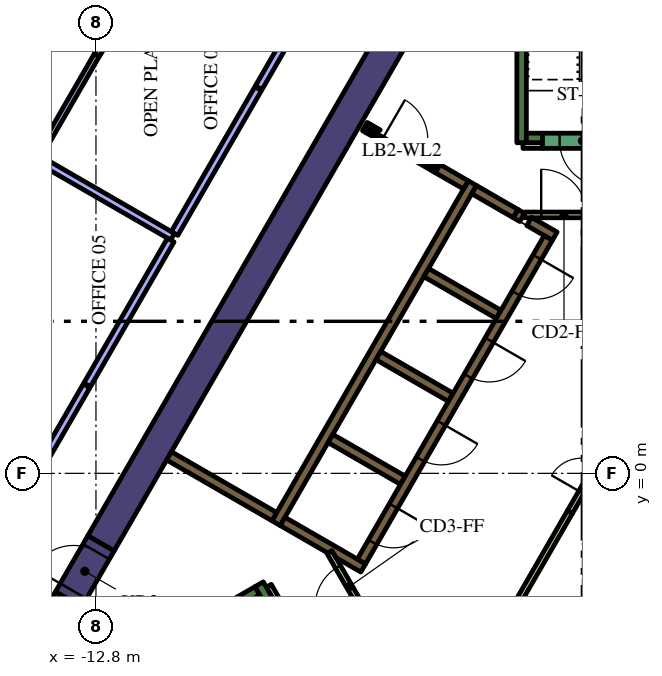
"""IFC4 building model, lengths in metres.
Left out: names, types, materials, properties, quantities, classifications, styles, units other than length and angle.
Written with IfcOpenShell. Run it as: python <this file> out.ifc"""

import sys

from ifc_helpers import new_model, si_unit, direction, frame, frame_2d, origin, place, context, subcontext, project, spatial, polyline, rectangle, outline, extrude, element, fill, save


model = new_model("IFC4")
c1 = context("Model", 3, precision=1e-05, world=origin(), true_north=direction((0.0, 1.0)))
c2 = subcontext(c1, "Body", "Model", "MODEL_VIEW")
j1 = project(units=[si_unit("LENGTHUNIT", "METRE"), si_unit("PLANEANGLEUNIT", "RADIAN")], contexts=[c1])
p1 = place(None, origin())
s1 = spatial("IfcSite", under=j1, at=p1, CompositionType="ELEMENT")
p2 = place(p1, origin())
s2 = spatial("IfcBuilding", under=s1, at=p2, CompositionType="ELEMENT")
p3 = place(p2, frame((0.0, 0.0, 158.4)))
s3 = spatial("IfcBuildingStorey", under=s2, at=p3, CompositionType="ELEMENT", Elevation=158.4)
p4 = place(p3, frame((-13.518, -3.314, 0.0), z_axis=(0.0, 0.0, 1.0), x_axis=(-0.499969377405, -0.866043083026, 0.0)))
e1 = element("IfcWall", 1, at=p4, inside=s3, PredefinedType="SOLIDWALL", context=c2, shape_type="SweptSolid", body=[
    extrude(rectangle(XDim=2.824, YDim=0.8, at=frame_2d((1.412, 0.0))), origin(), (0.0, 0.0, 1.0), 4.2),
])
p5 = place(p3, frame((-12.668, -1.842, 0.0), z_axis=(0.0, 0.0, 1.0), x_axis=(0.500003640647, 0.866023301845, 0.0)))
e2 = element("IfcWall", 2, at=p5, inside=s3, PredefinedType="SOLIDWALL", context=c2, shape_type="SweptSolid", body=[
    extrude(rectangle(XDim=15.858, YDim=0.8, at=frame_2d((7.929, 0.0))), origin(), (0.0, 0.0, 1.0), 4.2),
])
p6 = place(p3, frame((-1.6, 8.7, 0.0), z_axis=(0.0, 0.0, 1.0), x_axis=(0.0, 1.0, 0.0)))
e3 = element("IfcWall", 3, at=p6, inside=s3, PredefinedType="SOLIDWALL", context=c2, shape_type="SweptSolid", body=[
    extrude(rectangle(XDim=7.05, YDim=0.25, at=frame_2d((3.525, 0.0))), origin(), (0.0, 0.0, 1.0), 4.2),
])
p7 = place(p3, frame((-1.475, 8.825, 0.0), z_axis=(0.0, 0.0, 1.0), x_axis=(1.0, 0.0, 0.0)))
e4 = element("IfcWall", 4, at=p7, inside=s3, PredefinedType="SOLIDWALL", context=c2, shape_type="SweptSolid", body=[
    extrude(rectangle(XDim=0.425, YDim=0.25, at=frame_2d((0.212, 0.0))), origin(), (0.0, 0.0, 1.0), 4.2),
])
p8 = place(p3, frame((-14.44, -6.49, 0.0), z_axis=(0.0, 0.0, 1.0), x_axis=(0.866022966069, 0.500004222222, 0.0)))
e5 = element("IfcWall", 5, at=p8, inside=s3, PredefinedType="SOLIDWALL", context=c2, shape_type="SweptSolid", body=[
    extrude(rectangle(XDim=6.8, YDim=0.25, at=frame_2d((3.4, 0.0))), origin(), (0.0, 0.0, 1.0), 4.2),
])
p9 = place(p3, frame((-8.168, -3.503, 0.0), z_axis=(0.0, 0.0, 1.0), x_axis=(-0.499952099219, 0.866053057547, 0.0)))
e6 = element("IfcWall", 6, at=p9, inside=s3, PredefinedType="SOLIDWALL", context=c2, shape_type="SweptSolid", body=[
    extrude(rectangle(XDim=0.675, YDim=0.25, at=frame_2d((0.337, 0.0))), origin(), (0.0, 0.0, 1.0), 4.2),
])
p10 = place(p3, frame((-8.06, -1.311, 0.0), z_axis=(0.0, 0.0, 1.0), x_axis=(0.50000273126, 0.866023826885, 0.0)))
e7 = element("IfcWall", 7, at=p10, inside=s3, PredefinedType="SOLIDWALL", context=c2, shape_type="SweptSolid", body=[
    extrude(rectangle(XDim=10.33, YDim=0.25, at=frame_2d((5.165, 0.0))), origin(), (0.0, 0.0, 1.0), 4.2),
])
p11 = place(p3, frame((-1.758, 6.835, 0.0), z_axis=(0.0, 0.0, 1.0), x_axis=(0.865982457891, -0.500074377092, 0.0)))
e8 = element("IfcWall", 8, at=p11, inside=s3, PredefinedType="SOLIDWALL", context=c2, shape_type="SweptSolid", body=[
    extrude(rectangle(XDim=0.2, YDim=0.25, at=frame_2d((0.1, 0.0))), origin(), (0.0, 0.0, 1.0), 4.2),
])
p12 = place(p3, frame((-1.76, 6.836, 0.0), z_axis=(0.0, 0.0, 1.0), x_axis=(-0.865952863304, 0.500125622755, 0.0)))
e9 = element("IfcWall", 9, at=p12, inside=s3, PredefinedType="SOLIDWALL", context=c2, shape_type="SweptSolid", body=[
    extrude(rectangle(XDim=1.258, YDim=0.25, at=frame_2d((0.629, 0.0))), origin(), (0.0, 0.0, 1.0), 4.2),
])
p13 = place(p3, frame((-0.728, 6.24, 0.0), z_axis=(0.0, 0.0, 1.0), x_axis=(-0.865955664968, 0.500120771724, 0.0)))
e10 = element("IfcWall", 10, at=p13, inside=s3, PredefinedType="SOLIDWALL", context=c2, shape_type="SweptSolid", body=[
    extrude(rectangle(XDim=0.778, YDim=0.25, at=frame_2d((0.389, 0.0))), origin(), (0.0, 0.0, 1.0), 4.2),
])
for number, where, z_axis, x_axis in (
    (11, (-2.204, 4.182, 0.0), (0.0, 0.0, 1.0), (-0.866, 0.5, 0.0)),
    (12, (-5.369, 3.1, 0.0), (0.0, 0.0, 1.0), (0.866, -0.5, 0.0)),
    (13, (-4.724, -0.182, 0.0), (0.0, 0.0, 1.0), (-0.866, 0.5, 0.0)),
):
    element("IfcWall", number, at=place(p3, frame(where, z_axis=z_axis, x_axis=x_axis)), inside=s3, PredefinedType="SOLIDWALL", context=c2, shape_type="SweptSolid", body=[
        extrude(rectangle(XDim=2.2, YDim=0.25, at=frame_2d((1.1, 0.0))), origin(), (0.0, 0.0, 1.0), 4.2),
    ])
p14 = place(p3, origin())
e14 = element("IfcWall", 14, at=p14, inside=s3, PredefinedType="SOLIDWALL", context=c2, shape_type="SweptSolid", body=[
    extrude(outline(polyline([(-5.922, -2.257), (-5.922, -2.257), (-5.705, -2.382), (-5.83, -2.598), (-6.483, -2.221), (-6.591, -2.033), (-6.591, -2.033), (-6.7, -2.096), (-7.952, -1.373), (-7.827, -1.156), (-5.922, -2.257)])), origin(), (0.0, 0.0, 1.0), 4.2),
])
p15 = place(p3, frame((-8.106, -1.14, 0.0), z_axis=(0.0, 0.0, 1.0), x_axis=(-0.866008981251, 0.500028443584, 0.0)))
e15 = element("IfcWall", 15, at=p15, inside=s3, PredefinedType="SOLIDWALL", context=c2, shape_type="SweptSolid", body=[
    extrude(rectangle(XDim=3.2, YDim=0.25, at=frame_2d((1.6, 0.0))), origin(), (0.0, 0.0, 1.0), 4.2),
])
p16 = place(p3, frame((-5.725, 9.125, 0.0), z_axis=(0.0, 0.0, 1.0), x_axis=(0.866185586049, -0.49972245349, 0.0)))
e16 = element("IfcWall", 16, at=p16, inside=s3, PredefinedType="SOLIDWALL", context=c2, shape_type="SweptSolid", body=[
    extrude(rectangle(XDim=0.11, YDim=0.25, at=frame_2d((0.055, 0.0))), origin(), (0.0, 0.0, 1.0), 4.2),
])
p17 = place(p3, frame((-3.066, 7.59, 0.0), z_axis=(0.0, 0.0, 1.0), x_axis=(-0.866081358704, 0.49990307071, 0.0)))
e17 = element("IfcWall", 17, at=p17, inside=s3, PredefinedType="SOLIDWALL", context=c2, shape_type="SweptSolid", body=[
    extrude(rectangle(XDim=0.858, YDim=0.25, at=frame_2d((0.429, 0.0))), origin(), (0.0, 0.0, 1.0), 4.2),
])
e18 = element("IfcWall", 18, at=p14, inside=s3, PredefinedType="SOLIDWALL", context=c2, shape_type="SweptSolid", body=[
    extrude(outline(polyline([(-3.748, 8.128), (-3.813, 8.015), (-4.027, 8.139), (-4.017, 8.156), (-4.008, 8.173), (-4.0, 8.192), (-3.995, 8.21), (-3.991, 8.23), (-3.99, 8.25), (-3.99, 8.268), (-3.748, 8.128)])), origin(), (0.0, 0.0, 1.0), 4.2),
])
e19 = element("IfcWall", 19, at=p14, inside=s3, PredefinedType="SOLIDWALL", context=c2, shape_type="SweptSolid", body=[
    extrude(outline(polyline([(-5.689, 8.96), (-5.69, 8.961), (-5.565, 9.177), (-5.319, 9.035), (-5.335, 9.026), (-5.351, 9.015), (-5.366, 9.002), (-5.379, 8.988), (-5.392, 8.972), (-5.402, 8.956), (-5.412, 8.939), (-5.629, 9.064), (-5.629, 9.064), (-5.689, 8.96)])), origin(), (0.0, 0.0, 1.0), 4.2),
])
for number, where, z_axis, x_axis in (
    (20, (-8.252, -2.958, 0.0), (0.0, 0.0, 1.0), (0.5, -0.866, 0.0)),
    (21, (-1.564, 8.625, 0.0), (0.0, 0.0, 1.0), (1.0, 0.0, 0.0)),
):
    element("IfcWall", number, at=place(p3, frame(where, z_axis=z_axis, x_axis=x_axis)), inside=s3, PredefinedType="PARTITIONING", context=c2, shape_type="SweptSolid", body=[
        extrude(rectangle(XDim=0.514, YDim=0.15, at=frame_2d((0.257, 0.0))), origin(), (0.0, 0.0, 1.0), 3.15),
    ])
p18 = place(p3, frame((-1.887, -3.718, 0.0), z_axis=(0.0, 0.0, 1.0), x_axis=(0.500043732237, 0.866000153493, 0.0)))
e22 = element("IfcWall", 22, at=p18, inside=s3, PredefinedType="PARTITIONING", context=c2, shape_type="SweptSolid", body=[
    extrude(rectangle(XDim=3.114, YDim=0.15, at=frame_2d((1.557, 0.0))), origin(), (0.0, 0.0, 1.0), 3.15),
])
p19 = place(p3, frame((-0.898, 6.194, 0.0), z_axis=(0.0, 0.0, 1.0), x_axis=(-0.499996202215, -0.866027596426, 0.0)))
e23 = element("IfcWall", 23, at=p19, inside=s3, PredefinedType="SOLIDWALL", context=c2, shape_type="SweptSolid", body=[
    extrude(rectangle(XDim=9.83, YDim=0.25, at=frame_2d((4.915, 0.0))), origin(), (0.0, 0.0, 1.0), 4.2),
])
p20 = place(p19, frame((0.585, 0.0, 0.0)))
e24 = element("IfcOpeningElement", 24, at=p20, cuts=e23, PredefinedType="OPENING", context=c2, shape_type="SweptSolid", body=[
    extrude(rectangle(XDim=1.1, YDim=2.1, at=frame_2d((0.55, 1.05))), frame((0.0, 0.135, 0.0), z_axis=(0.0, -1.0, 0.0), x_axis=(1.0, 0.0, 0.0)), (0.0, 0.0, 1.0), 0.27),
])
p21 = place(p19, frame((3.105, 0.0, 0.0)))
e25 = element("IfcOpeningElement", 25, at=p21, cuts=e23, PredefinedType="OPENING", context=c2, shape_type="SweptSolid", body=[
    extrude(rectangle(XDim=1.1, YDim=2.1, at=frame_2d((0.55, 1.05))), frame((0.0, 0.135, 0.0), z_axis=(0.0, -1.0, 0.0), x_axis=(1.0, 0.0, 0.0)), (0.0, 0.0, 1.0), 0.27),
])
p22 = place(p19, frame((5.625, 0.0, 0.0)))
e26 = element("IfcOpeningElement", 26, at=p22, cuts=e23, PredefinedType="OPENING", context=c2, shape_type="SweptSolid", body=[
    extrude(rectangle(XDim=1.1, YDim=2.1, at=frame_2d((0.55, 1.05))), frame((0.0, 0.135, 0.0), z_axis=(0.0, -1.0, 0.0), x_axis=(1.0, 0.0, 0.0)), (0.0, 0.0, 1.0), 0.27),
])
p23 = place(p19, frame((8.145, 0.0, 0.0)))
e27 = element("IfcOpeningElement", 27, at=p23, cuts=e23, PredefinedType="OPENING", context=c2, shape_type="SweptSolid", body=[
    extrude(rectangle(XDim=1.1, YDim=2.1, at=frame_2d((0.55, 1.05))), frame((0.0, 0.135, 0.0), z_axis=(0.0, -1.0, 0.0), x_axis=(1.0, 0.0, 0.0)), (0.0, 0.0, 1.0), 0.27),
])
p24 = place(p3, frame((1.05, 8.75, 0.0), z_axis=(0.0, 0.0, 1.0), x_axis=(-1.0, 0.0, 0.0)))
e28 = element("IfcWall", 28, at=p24, inside=s3, PredefinedType="SOLIDWALL", context=c2, shape_type="SweptSolid", body=[
    extrude(rectangle(XDim=2.1, YDim=0.4, at=frame_2d((1.05, 0.0))), origin(), (0.0, 0.0, 1.0), 4.2),
])
p25 = place(p24, frame((0.45, 0.0, 0.0)))
e29 = element("IfcOpeningElement", 29, at=p25, cuts=e28, PredefinedType="OPENING", context=c2, shape_type="SweptSolid", body=[
    extrude(rectangle(XDim=1.2, YDim=2.1, at=frame_2d((0.6, 1.05))), frame((0.0, 0.21, 0.0), z_axis=(0.0, -1.0, 0.0), x_axis=(1.0, 0.0, 0.0)), (0.0, 0.0, 1.0), 0.42),
])
p26 = place(p3, frame((-0.33, -1.022, 0.0), z_axis=(0.0, 0.0, 1.0), x_axis=(0.500027713859, 0.866009402589, 0.0)))
e30 = element("IfcWall", 30, at=p26, inside=s3, PredefinedType="PARTITIONING", context=c2, shape_type="SweptSolid", body=[
    extrude(rectangle(XDim=2.1, YDim=0.15, at=frame_2d((1.05, 0.0))), origin(), (0.0, 0.0, 1.0), 3.15),
])
p27 = place(p26, frame((0.6, 0.0, 0.0)))
e31 = element("IfcOpeningElement", 31, at=p27, cuts=e30, PredefinedType="OPENING", context=c2, shape_type="SweptSolid", body=[
    extrude(rectangle(XDim=0.9, YDim=2.1, at=frame_2d((0.45, 1.05))), frame((0.0, 0.085, 0.0), z_axis=(0.0, -1.0, 0.0), x_axis=(1.0, 0.0, 0.0)), (0.0, 0.0, 1.0), 0.17),
])
p28 = place(p3, frame((-1.534, 6.8, 0.0), z_axis=(0.0, 0.0, 1.0), x_axis=(1.0, 0.0, 0.0)))
e32 = element("IfcWall", 32, at=p28, inside=s3, PredefinedType="PARTITIONING", context=c2, shape_type="SweptSolid", body=[
    extrude(rectangle(XDim=2.1, YDim=0.15, at=frame_2d((1.05, 0.0))), origin(), (0.0, 0.0, 1.0), 3.15),
])
p29 = place(p28, frame((0.45, 0.0, 0.0)))
e33 = element("IfcOpeningElement", 33, at=p29, cuts=e32, PredefinedType="OPENING", context=c2, shape_type="SweptSolid", body=[
    extrude(rectangle(XDim=1.2, YDim=2.1, at=frame_2d((0.6, 1.05))), frame((0.0, 0.085, 0.0), z_axis=(0.0, -1.0, 0.0), x_axis=(1.0, 0.0, 0.0)), (0.0, 0.0, 1.0), 0.17),
])
p30 = place(p3, frame((-5.606, -3.89, 0.0), z_axis=(0.0, 0.0, 1.0), x_axis=(-0.500027713859, 0.866009402589, 0.0)))
e34 = element("IfcWall", 34, at=p30, inside=s3, PredefinedType="PARTITIONING", context=c2, shape_type="SweptSolid", body=[
    extrude(rectangle(XDim=2.1, YDim=0.15, at=frame_2d((1.05, 0.0))), origin(), (0.0, 0.0, 1.0), 3.15),
])
p31 = place(p30, frame((0.45, 0.0, 0.0)))
e35 = element("IfcOpeningElement", 35, at=p31, cuts=e34, PredefinedType="OPENING", context=c2, shape_type="SweptSolid", body=[
    extrude(rectangle(XDim=1.2, YDim=2.1, at=frame_2d((0.6, 1.05))), frame((0.0, 0.085, 0.0), z_axis=(0.0, -1.0, 0.0), x_axis=(1.0, 0.0, 0.0)), (0.0, 0.0, 1.0), 0.17),
])
p32 = place(p3, frame((-5.659, 9.012, 0.0), z_axis=(0.0, 0.0, 1.0), x_axis=(0.866009402589, -0.500027713859, 0.0)))
e36 = element("IfcWall", 36, at=p32, inside=s3, PredefinedType="PARTITIONING", context=c2, shape_type="SweptSolid", body=[
    extrude(rectangle(XDim=2.1, YDim=0.12, at=frame_2d((1.05, 0.0))), origin(), (0.0, 0.0, 1.0), 3.15),
])
p33 = place(p32, frame((0.45, 0.0, 0.0)))
e37 = element("IfcOpeningElement", 37, at=p33, cuts=e36, PredefinedType="OPENING", context=c2, shape_type="SweptSolid", body=[
    extrude(rectangle(XDim=1.2, YDim=2.1, at=frame_2d((0.6, 1.05))), frame((0.0, 0.07, 0.0), z_axis=(0.0, -1.0, 0.0), x_axis=(1.0, 0.0, 0.0)), (0.0, 0.0, 1.0), 0.14),
])
p34 = place(p3, frame((-13.518, -3.314, 0.0), z_axis=(0.0, 0.0, 1.0), x_axis=(0.500062241894, 0.865989465428, 0.0)))
e38 = element("IfcWall", 38, at=p34, inside=s3, PredefinedType="SOLIDWALL", context=c2, shape_type="SweptSolid", body=[
    extrude(rectangle(XDim=1.7, YDim=0.8, at=frame_2d((0.85, 0.0))), origin(), (0.0, 0.0, 1.0), 4.2),
])
p35 = place(p34, frame((0.25, 0.0, 0.0)))
e39 = element("IfcOpeningElement", 39, at=p35, cuts=e38, PredefinedType="OPENING", context=c2, shape_type="SweptSolid", body=[
    extrude(rectangle(XDim=1.2, YDim=2.1, at=frame_2d((0.6, 1.05))), frame((0.0, 0.41, 0.0), z_axis=(0.0, -1.0, 0.0), x_axis=(1.0, 0.0, 0.0)), (0.0, 0.0, 1.0), 0.82),
])
p36 = place(p3, frame((-12.779, 11.002, 0.0), z_axis=(0.0, 0.0, 1.0), x_axis=(0.527026092571, 0.849849102929, 0.0)))
e40 = element("IfcWall", 40, at=p36, inside=s3, PredefinedType="PARTITIONING", context=c2, shape_type="SweptSolid", body=[
    extrude(rectangle(XDim=6.407, YDim=0.15, at=frame_2d((3.204, 0.0))), origin(), (0.0, 0.0, 1.0), 3.15),
])
p37 = place(p36, frame((2.707, 0.0, 0.0)))
e41 = element("IfcOpeningElement", 41, at=p37, cuts=e40, PredefinedType="OPENING", context=c2, shape_type="SweptSolid", body=[
    extrude(rectangle(XDim=0.9, YDim=2.1, at=frame_2d((0.45, 1.05))), frame((0.0, 0.085, 0.0), z_axis=(0.0, -1.0, 0.0), x_axis=(1.0, 0.0, 0.0)), (0.0, 0.0, 1.0), 0.17),
])
p38 = place(p3, frame((-12.779, 11.002, 0.0), z_axis=(0.0, 0.0, 1.0), x_axis=(-0.499996312652, -0.866027532665, 0.0)))
e42 = element("IfcWall", 42, at=p38, inside=s3, PredefinedType="PARTITIONING", context=c2, shape_type="SweptSolid", body=[
    extrude(rectangle(XDim=3.138, YDim=0.15, at=frame_2d((1.569, 0.0))), origin(), (0.0, 0.0, 1.0), 3.15),
])
p39 = place(p3, frame((-10.782, 6.225, 0.0), z_axis=(0.0, 0.0, 1.0), x_axis=(-0.866034752867, 0.499983806564, 0.0)))
e43 = element("IfcWall", 43, at=p39, inside=s3, PredefinedType="PARTITIONING", context=c2, shape_type="SweptSolid", body=[
    extrude(rectangle(XDim=4.043, YDim=0.2, at=frame_2d((2.021, 0.0))), origin(), (0.0, 0.0, 1.0), 3.15),
])
p40 = place(p3, frame((-8.532, 10.122, 0.0), z_axis=(0.0, 0.0, 1.0), x_axis=(-0.499988222896, -0.866032203192, 0.0)))
e44 = element("IfcWall", 44, at=p40, inside=s3, PredefinedType="PARTITIONING", context=c2, shape_type="SweptSolid", body=[
    extrude(rectangle(XDim=4.4, YDim=0.2, at=frame_2d((2.2, 0.0))), origin(), (0.0, 0.0, 1.0), 3.15),
])
p41 = place(p3, frame((-3.522, 18.8, 0.0), z_axis=(0.0, 0.0, 1.0), x_axis=(-0.500015783377, -0.866016291056, 0.0)))
e45 = element("IfcWall", 45, at=p41, inside=s3, PredefinedType="PARTITIONING", context=c2, shape_type="SweptSolid", body=[
    extrude(rectangle(XDim=9.99, YDim=0.2, at=frame_2d((4.995, 0.0))), origin(), (0.0, 0.0, 1.0), 3.15),
])
p42 = place(p41, frame((4.5, 0.0, 0.0)))
e46 = element("IfcOpeningElement", 46, at=p42, cuts=e45, PredefinedType="OPENING", context=c2, shape_type="SweptSolid", body=[
    extrude(rectangle(XDim=1.0, YDim=2.1, at=frame_2d((0.5, 1.05))), frame((0.0, 0.11, 0.0), z_axis=(0.0, -1.0, 0.0), x_axis=(1.0, 0.0, 0.0)), (0.0, 0.0, 1.0), 0.22),
])
p43 = place(p3, frame((-10.832, 6.138, 0.0), z_axis=(0.0, 0.0, 1.0), x_axis=(-0.499988222896, -0.866032203192, 0.0)))
e47 = element("IfcWall", 47, at=p43, inside=s3, PredefinedType="PARTITIONING", context=c2, shape_type="SweptSolid", body=[
    extrude(rectangle(XDim=4.4, YDim=0.2, at=frame_2d((2.2, 0.0))), origin(), (0.0, 0.0, 1.0), 3.15),
])
p44 = place(p3, frame((-13.047, 2.302, 0.0), z_axis=(0.0, 0.0, 1.0), x_axis=(-0.499986873641, -0.866032982159, 0.0)))
e48 = element("IfcWall", 48, at=p44, inside=s3, PredefinedType="PARTITIONING", context=c2, shape_type="SweptSolid", body=[
    extrude(rectangle(XDim=9.99, YDim=0.2, at=frame_2d((4.995, 0.0))), origin(), (0.0, 0.0, 1.0), 3.15),
])
p45 = place(p44, frame((4.5, 0.0, 0.0)))
e49 = element("IfcOpeningElement", 49, at=p45, cuts=e48, PredefinedType="OPENING", context=c2, shape_type="SweptSolid", body=[
    extrude(rectangle(XDim=1.0, YDim=2.1, at=frame_2d((0.5, 1.05))), frame((0.0, 0.11, 0.0), z_axis=(0.0, -1.0, 0.0), x_axis=(1.0, 0.0, 0.0)), (0.0, 0.0, 1.0), 0.22),
])
p46 = place(p20, origin())
e50 = element("IfcDoor", 50, at=p46, inside=s3, OperationType="DOUBLE_DOOR_SLIDING", PredefinedType="DOOR", context=c2, shape_type="SweptSolid", body=[
    extrude(rectangle(XDim=1.1, YDim=2.1, at=frame_2d((0.55, 1.05))), frame((0.0, 0.025, 0.0), z_axis=(0.0, -1.0, 0.0), x_axis=(1.0, 0.0, 0.0)), (0.0, 0.0, 1.0), 0.05),
])
fill(e24, e50)
p47 = place(p21, origin())
e51 = element("IfcDoor", 51, at=p47, inside=s3, OperationType="DOUBLE_DOOR_SLIDING", PredefinedType="DOOR", context=c2, shape_type="SweptSolid", body=[
    extrude(rectangle(XDim=1.1, YDim=2.1, at=frame_2d((0.55, 1.05))), frame((0.0, 0.025, 0.0), z_axis=(0.0, -1.0, 0.0), x_axis=(1.0, 0.0, 0.0)), (0.0, 0.0, 1.0), 0.05),
])
fill(e25, e51)
p48 = place(p22, origin())
e52 = element("IfcDoor", 52, at=p48, inside=s3, OperationType="DOUBLE_DOOR_SLIDING", PredefinedType="DOOR", context=c2, shape_type="SweptSolid", body=[
    extrude(rectangle(XDim=1.1, YDim=2.1, at=frame_2d((0.55, 1.05))), frame((0.0, 0.025, 0.0), z_axis=(0.0, -1.0, 0.0), x_axis=(1.0, 0.0, 0.0)), (0.0, 0.0, 1.0), 0.05),
])
fill(e26, e52)
p49 = place(p23, origin())
e53 = element("IfcDoor", 53, at=p49, inside=s3, OperationType="DOUBLE_DOOR_SLIDING", PredefinedType="DOOR", context=c2, shape_type="SweptSolid", body=[
    extrude(rectangle(XDim=1.1, YDim=2.1, at=frame_2d((0.55, 1.05))), frame((0.0, 0.025, 0.0), z_axis=(0.0, -1.0, 0.0), x_axis=(1.0, 0.0, 0.0)), (0.0, 0.0, 1.0), 0.05),
])
fill(e27, e53)
p50 = place(p25, origin())
e54 = element("IfcDoor", 54, at=p50, inside=s3, OperationType="SINGLE_SWING_LEFT", PredefinedType="DOOR", context=c2, shape_type="SweptSolid", body=[
    extrude(rectangle(XDim=1.2, YDim=2.1, at=frame_2d((0.6, 1.05))), frame((0.0, 0.025, 0.0), z_axis=(0.0, -1.0, 0.0), x_axis=(1.0, 0.0, 0.0)), (0.0, 0.0, 1.0), 0.05),
])
fill(e29, e54)
p51 = place(p27, origin())
e55 = element("IfcDoor", 55, at=p51, inside=s3, OperationType="SINGLE_SWING_LEFT", PredefinedType="DOOR", context=c2, shape_type="SweptSolid", body=[
    extrude(rectangle(XDim=0.9, YDim=2.1, at=frame_2d((0.45, 1.05))), frame((0.0, 0.025, 0.0), z_axis=(0.0, -1.0, 0.0), x_axis=(1.0, 0.0, 0.0)), (0.0, 0.0, 1.0), 0.05),
])
fill(e31, e55)
p52 = place(p29, origin())
e56 = element("IfcDoor", 56, at=p52, inside=s3, OperationType="SINGLE_SWING_LEFT", PredefinedType="DOOR", context=c2, shape_type="SweptSolid", body=[
    extrude(rectangle(XDim=1.2, YDim=2.1, at=frame_2d((0.6, 1.05))), frame((0.0, 0.025, 0.0), z_axis=(0.0, -1.0, 0.0), x_axis=(1.0, 0.0, 0.0)), (0.0, 0.0, 1.0), 0.05),
])
fill(e33, e56)
p53 = place(p31, origin())
e57 = element("IfcDoor", 57, at=p53, inside=s3, OperationType="SINGLE_SWING_LEFT", PredefinedType="DOOR", context=c2, shape_type="SweptSolid", body=[
    extrude(rectangle(XDim=1.2, YDim=2.1, at=frame_2d((0.6, 1.05))), frame((0.0, 0.025, 0.0), z_axis=(0.0, -1.0, 0.0), x_axis=(1.0, 0.0, 0.0)), (0.0, 0.0, 1.0), 0.05),
])
fill(e35, e57)
p54 = place(p33, origin())
e58 = element("IfcDoor", 58, at=p54, inside=s3, OperationType="SINGLE_SWING_LEFT", PredefinedType="DOOR", context=c2, shape_type="SweptSolid", body=[
    extrude(rectangle(XDim=1.2, YDim=2.1, at=frame_2d((0.6, 1.05))), frame((0.0, 0.025, 0.0), z_axis=(0.0, -1.0, 0.0), x_axis=(1.0, 0.0, 0.0)), (0.0, 0.0, 1.0), 0.05),
])
fill(e37, e58)
p55 = place(p35, origin())
e59 = element("IfcDoor", 59, at=p55, inside=s3, OperationType="SINGLE_SWING_LEFT", PredefinedType="DOOR", context=c2, shape_type="SweptSolid", body=[
    extrude(rectangle(XDim=1.2, YDim=2.1, at=frame_2d((0.6, 1.05))), frame((0.0, 0.025, 0.0), z_axis=(0.0, -1.0, 0.0), x_axis=(1.0, 0.0, 0.0)), (0.0, 0.0, 1.0), 0.05),
])
fill(e39, e59)
save(model, sys.argv[1])
